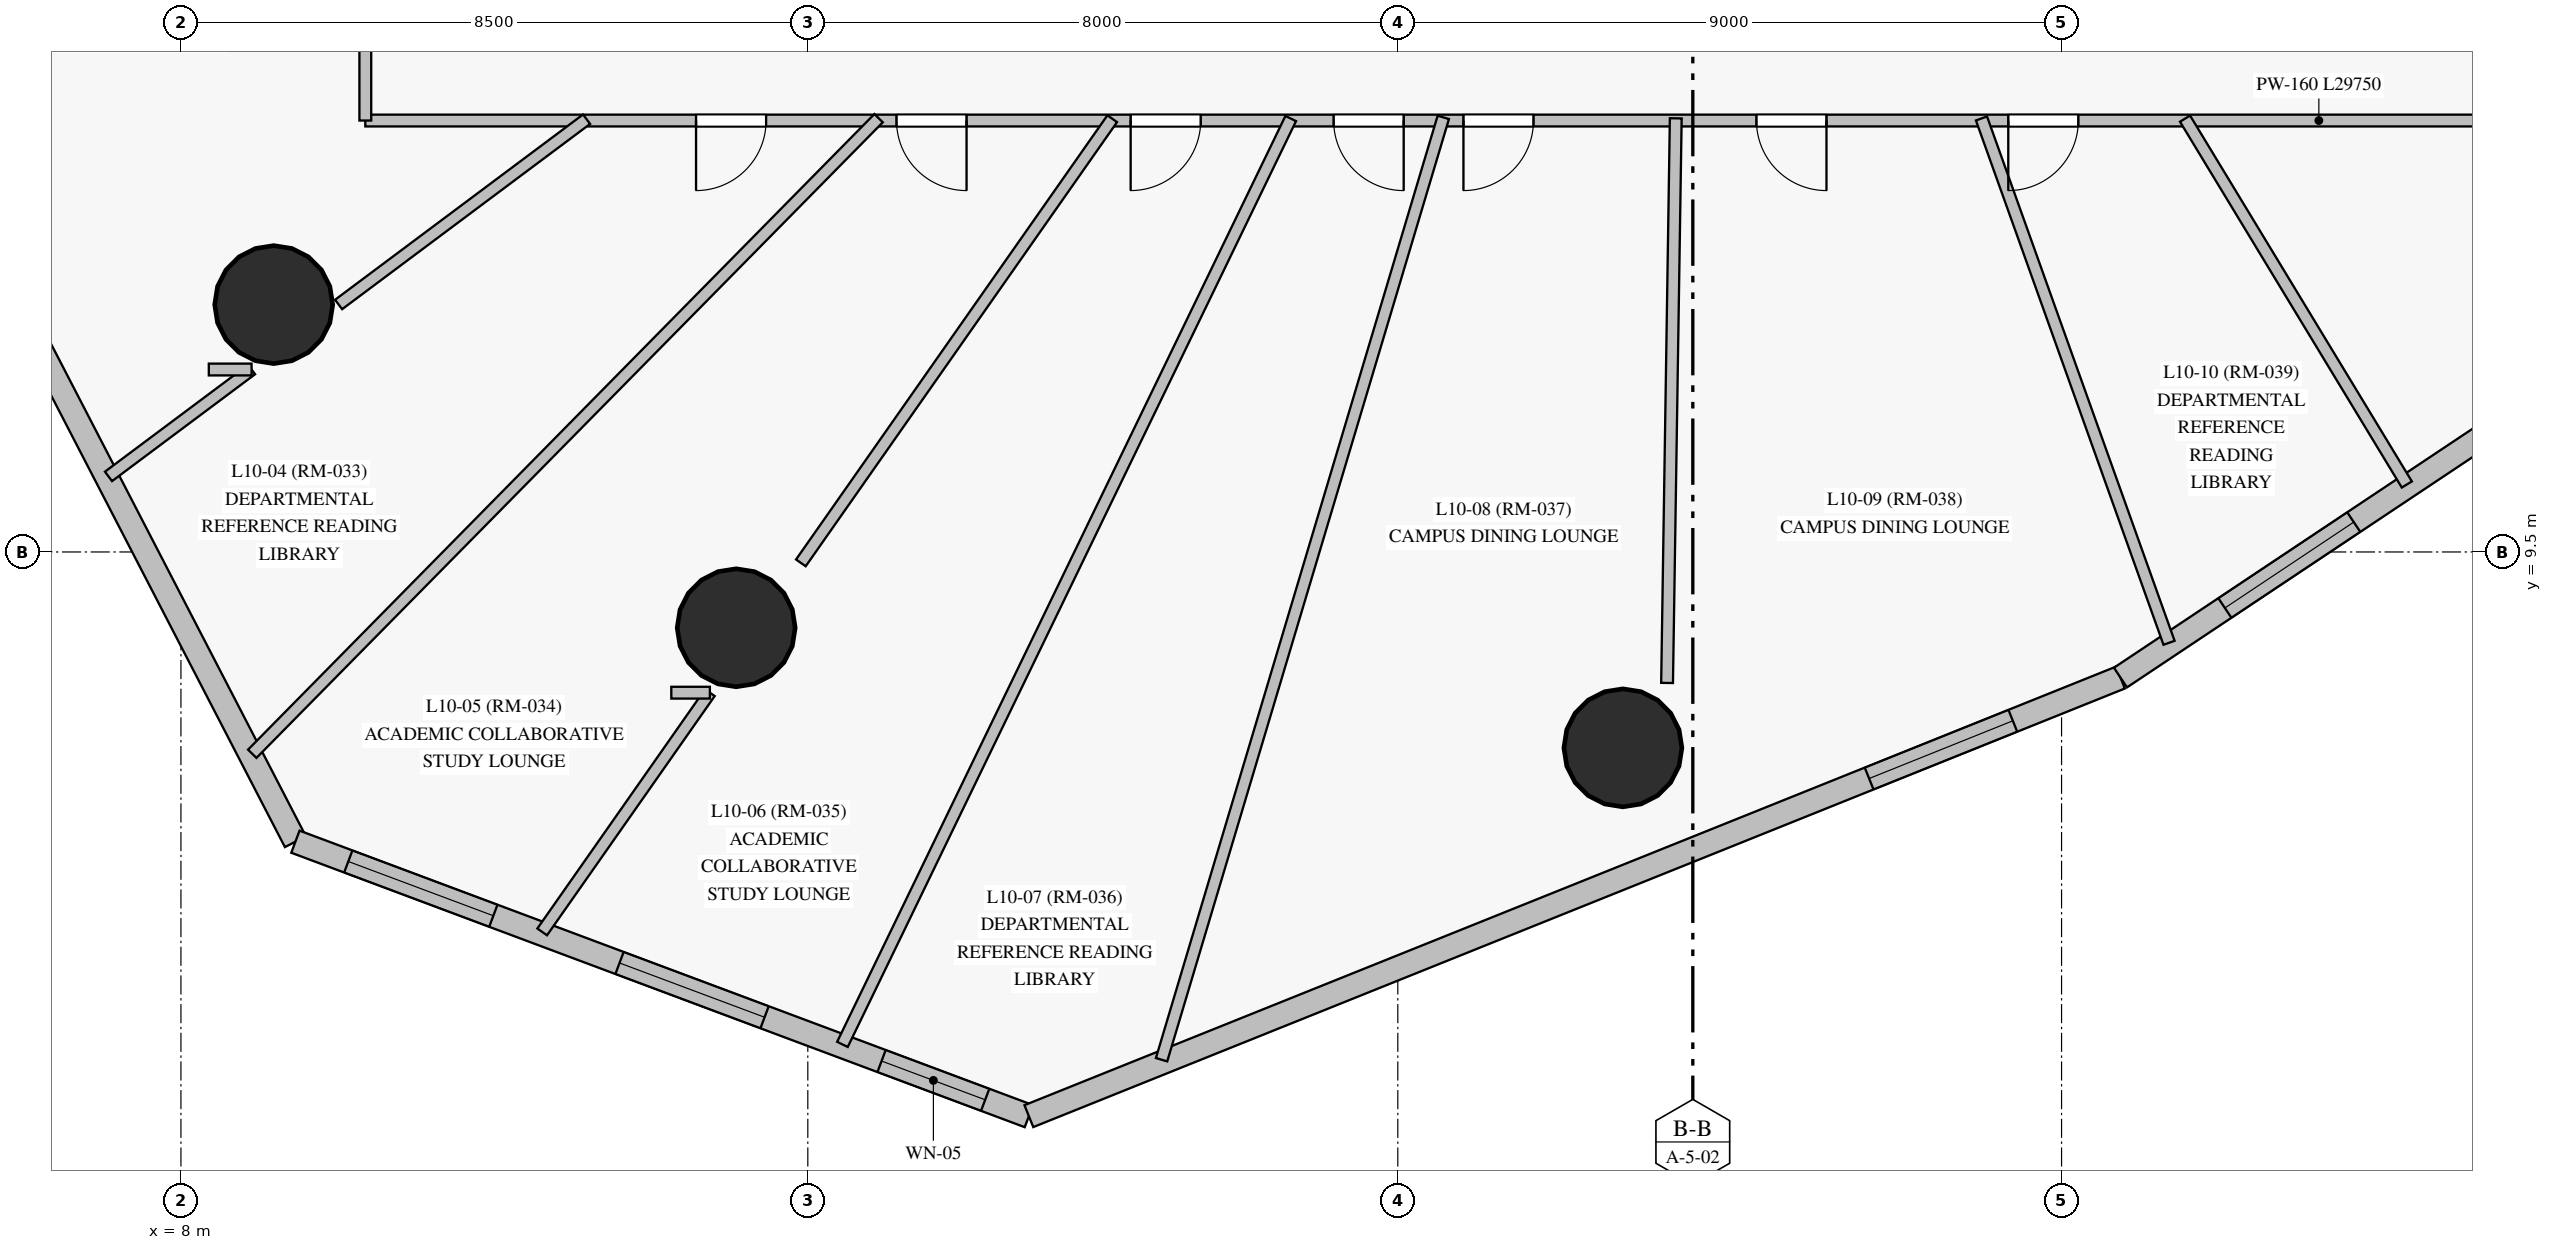
"""IFC4 building model, lengths in metres.
Left out: names, types, materials, properties, quantities, classifications, styles, units other than length and angle.
Written with IfcOpenShell. Run it as: python <this file> out.ifc"""

import sys

from ifc_helpers import new_model, si_unit, direction, frame, frame_2d, origin, origin_with_axes, origin_2d, place, context, subcontext, project, spatial, rectangle, circle, extrude, source, transform, mapped, element, fill, save


model = new_model("IFC4")
c1 = context("Model", 3, precision=1e-05, world=origin(), true_north=direction((0.0, 1.0)))
c2 = subcontext(c1, "Body", "Model", "MODEL_VIEW")
j1 = project(units=[si_unit("LENGTHUNIT", "METRE"), si_unit("PLANEANGLEUNIT", "RADIAN")], contexts=[c1])
p1 = place(None, origin())
s1 = spatial("IfcSite", under=j1, at=p1, CompositionType="ELEMENT")
p2 = place(p1, origin())
s2 = spatial("IfcBuilding", under=s1, at=p2, CompositionType="ELEMENT")
p3 = place(p2, frame((0.0, 0.0, 40.9)))
s3 = spatial("IfcBuildingStorey", under=s2, at=p3, CompositionType="ELEMENT", Elevation=40.9)
m1 = source(origin_with_axes(), c2, "Body", "SweptSolid", [
    extrude(circle(Radius=0.8, at=origin_2d()), origin(), (0.0, 0.0, 1.0), 3.6),
])
for number, where, z_axis, x_axis in (
    (1, (9.258, 12.854, 0.0), (0.0, 0.0, 1.0), (1.0, 0.0, 0.0)),
    (2, (15.529, 8.472, 0.0), (0.0, 0.0, 1.0), (1.0, 0.0, 0.0)),
    (3, (27.552, 6.844, 0.0), (0.0, 0.0, 1.0), (1.0, 0.0, 0.0)),
):
    element("IfcColumn", number, at=place(p3, frame(where, z_axis=z_axis, x_axis=x_axis)), inside=s3, PredefinedType="COLUMN", context=c2, shape_type="MappedRepresentation", body=[
        mapped(m1, transform((0.0, 0.0, 0.0), scale=1.0)),
    ])
p4 = place(p3, frame((3.479, 17.305, 0.0), z_axis=(0.0, 0.0, 1.0), x_axis=(0.459668719491, -0.888090461789, 0.0)))
e4 = element("IfcWall", 4, at=p4, inside=s3, PredefinedType="SOLIDWALL", context=c2, shape_type="SweptSolid", body=[
    extrude(rectangle(XDim=13.212, YDim=0.32, at=frame_2d((6.606, 0.0))), origin(), (0.0, 0.0, 1.0), 3.35),
])
p5 = place(p4, frame((2.236, 0.0, 0.85)))
e5 = element("IfcOpeningElement", 5, at=p5, cuts=e4, PredefinedType="OPENING", context=c2, shape_type="SweptSolid", body=[
    extrude(rectangle(XDim=2.1, YDim=1.95, at=frame_2d((1.05, 0.975))), frame((0.0, 0.17, 0.0), z_axis=(0.0, -1.0, 0.0), x_axis=(1.0, 0.0, 0.0)), (0.0, 0.0, 1.0), 0.34),
])
p6 = place(p3, frame((9.552, 5.572, 0.0), z_axis=(0.0, 0.0, 1.0), x_axis=(0.936575558509, -0.350465723293, 0.0)))
e6 = element("IfcWall", 6, at=p6, inside=s3, PredefinedType="SOLIDWALL", context=c2, shape_type="SweptSolid", body=[
    extrude(rectangle(XDim=10.619, YDim=0.32, at=frame_2d((5.309, 0.0))), origin(), (0.0, 0.0, 1.0), 3.35),
])
p7 = place(p6, frame((0.766, 0.0, 0.85)))
e7 = element("IfcOpeningElement", 7, at=p7, cuts=e6, PredefinedType="OPENING", context=c2, shape_type="SweptSolid", body=[
    extrude(rectangle(XDim=2.1, YDim=1.95, at=frame_2d((1.05, 0.975))), frame((0.0, 0.17, 0.0), z_axis=(0.0, -1.0, 0.0), x_axis=(1.0, 0.0, 0.0)), (0.0, 0.0, 1.0), 0.34),
])
p8 = place(p6, frame((4.692, 0.0, 0.85)))
e8 = element("IfcOpeningElement", 8, at=p8, cuts=e6, PredefinedType="OPENING", context=c2, shape_type="SweptSolid", body=[
    extrude(rectangle(XDim=2.1, YDim=1.95, at=frame_2d((1.05, 0.975))), frame((0.0, 0.17, 0.0), z_axis=(0.0, -1.0, 0.0), x_axis=(1.0, 0.0, 0.0)), (0.0, 0.0, 1.0), 0.34),
])
p9 = place(p6, frame((8.486, 0.0, 0.85)))
e9 = element("IfcOpeningElement", 9, at=p9, cuts=e6, PredefinedType="OPENING", context=c2, shape_type="SweptSolid", body=[
    extrude(rectangle(XDim=1.5, YDim=1.85, at=frame_2d((0.75, 0.925))), frame((0.0, 0.17, 0.0), z_axis=(0.0, -1.0, 0.0), x_axis=(1.0, 0.0, 0.0)), (0.0, 0.0, 1.0), 0.34),
])
p10 = place(p3, frame((19.497, 1.85, 0.0), z_axis=(0.0, 0.0, 1.0), x_axis=(0.927904553419, 0.372817837213, 0.0)))
e10 = element("IfcWall", 10, at=p10, inside=s3, PredefinedType="SOLIDWALL", context=c2, shape_type="SweptSolid", body=[
    extrude(rectangle(XDim=15.952, YDim=0.32, at=frame_2d((7.976, 0.0))), origin(), (0.0, 0.0, 1.0), 3.02),
])
p11 = place(p10, frame((12.279, 0.0, 0.85)))
e11 = element("IfcOpeningElement", 11, at=p11, cuts=e10, PredefinedType="OPENING", context=c2, shape_type="SweptSolid", body=[
    extrude(rectangle(XDim=2.1, YDim=1.95, at=frame_2d((1.05, 0.975))), frame((0.0, 0.17, 0.0), z_axis=(0.0, -1.0, 0.0), x_axis=(1.0, 0.0, 0.0)), (0.0, 0.0, 1.0), 0.34),
])
p12 = place(p3, frame((34.299, 7.797, 0.0), z_axis=(0.0, 0.0, 1.0), x_axis=(0.832151862044, 0.554547814437, 0.0)))
e12 = element("IfcWall", 12, at=p12, inside=s3, PredefinedType="SOLIDWALL", context=c2, shape_type="SweptSolid", body=[
    extrude(rectangle(XDim=11.093, YDim=0.32, at=frame_2d((5.546, 0.0))), origin(), (0.0, 0.0, 1.0), 3.35),
])
p13 = place(p12, frame((1.701, 0.0, 0.85)))
e13 = element("IfcOpeningElement", 13, at=p13, cuts=e12, PredefinedType="OPENING", context=c2, shape_type="SweptSolid", body=[
    extrude(rectangle(XDim=2.1, YDim=1.95, at=frame_2d((1.05, 0.975))), frame((0.0, 0.17, 0.0), z_axis=(0.0, -1.0, 0.0), x_axis=(1.0, 0.0, 0.0)), (0.0, 0.0, 1.0), 0.34),
])
p14 = place(p12, frame((6.809, 0.0, 0.85)))
e14 = element("IfcOpeningElement", 14, at=p14, cuts=e12, PredefinedType="OPENING", context=c2, shape_type="SweptSolid", body=[
    extrude(rectangle(XDim=2.1, YDim=1.95, at=frame_2d((1.05, 0.975))), frame((0.0, 0.17, 0.0), z_axis=(0.0, -1.0, 0.0), x_axis=(1.0, 0.0, 0.0)), (0.0, 0.0, 1.0), 0.34),
])
p15 = place(p3, frame((40.25, 15.35, 0.0), z_axis=(0.0, 0.0, 1.0), x_axis=(-1.0, 0.0, 0.0)))
e15 = element("IfcWall", 15, at=p15, inside=s3, PredefinedType="PARTITIONING", context=c2, shape_type="SweptSolid", body=[
    extrude(rectangle(XDim=29.75, YDim=0.16, at=frame_2d((14.875, 0.0))), origin(), (0.0, 0.0, 1.0), 2.7),
])
p16 = place(p15, frame((24.315, 0.0, 0.0)))
e16 = element("IfcOpeningElement", 16, at=p16, cuts=e15, PredefinedType="OPENING", context=c2, shape_type="SweptSolid", body=[
    extrude(rectangle(XDim=0.95, YDim=2.15, at=frame_2d((0.475, 1.075))), frame((0.0, 0.09, 0.0), z_axis=(0.0, -1.0, 0.0), x_axis=(1.0, 0.0, 0.0)), (0.0, 0.0, 1.0), 0.18),
])
p17 = place(p15, frame((21.597, 0.0, 0.0)))
e17 = element("IfcOpeningElement", 17, at=p17, cuts=e15, PredefinedType="OPENING", context=c2, shape_type="SweptSolid", body=[
    extrude(rectangle(XDim=0.95, YDim=2.15, at=frame_2d((0.475, 1.075))), frame((0.0, 0.09, 0.0), z_axis=(0.0, -1.0, 0.0), x_axis=(1.0, 0.0, 0.0)), (0.0, 0.0, 1.0), 0.18),
])
p18 = place(p15, frame((18.423, 0.0, 0.0)))
e18 = element("IfcOpeningElement", 18, at=p18, cuts=e15, PredefinedType="OPENING", context=c2, shape_type="SweptSolid", body=[
    extrude(rectangle(XDim=0.95, YDim=2.15, at=frame_2d((0.475, 1.075))), frame((0.0, 0.09, 0.0), z_axis=(0.0, -1.0, 0.0), x_axis=(1.0, 0.0, 0.0)), (0.0, 0.0, 1.0), 0.18),
])
p19 = place(p15, frame((15.67, 0.0, 0.0)))
e19 = element("IfcOpeningElement", 19, at=p19, cuts=e15, PredefinedType="OPENING", context=c2, shape_type="SweptSolid", body=[
    extrude(rectangle(XDim=0.95, YDim=2.15, at=frame_2d((0.475, 1.075))), frame((0.0, 0.09, 0.0), z_axis=(0.0, -1.0, 0.0), x_axis=(1.0, 0.0, 0.0)), (0.0, 0.0, 1.0), 0.18),
])
p20 = place(p15, frame((13.91, 0.0, 0.0)))
e20 = element("IfcOpeningElement", 20, at=p20, cuts=e15, PredefinedType="OPENING", context=c2, shape_type="SweptSolid", body=[
    extrude(rectangle(XDim=0.95, YDim=2.15, at=frame_2d((0.475, 1.075))), frame((0.0, 0.09, 0.0), z_axis=(0.0, -1.0, 0.0), x_axis=(1.0, 0.0, 0.0)), (0.0, 0.0, 1.0), 0.18),
])
p21 = place(p15, frame((9.938, 0.0, 0.0)))
e21 = element("IfcOpeningElement", 21, at=p21, cuts=e15, PredefinedType="OPENING", context=c2, shape_type="SweptSolid", body=[
    extrude(rectangle(XDim=0.95, YDim=2.15, at=frame_2d((0.475, 1.075))), frame((0.0, 0.09, 0.0), z_axis=(0.0, -1.0, 0.0), x_axis=(1.0, 0.0, 0.0)), (0.0, 0.0, 1.0), 0.18),
])
p22 = place(p15, frame((6.522, 0.0, 0.0)))
e22 = element("IfcOpeningElement", 22, at=p22, cuts=e15, PredefinedType="OPENING", context=c2, shape_type="SweptSolid", body=[
    extrude(rectangle(XDim=0.95, YDim=2.15, at=frame_2d((0.475, 1.075))), frame((0.0, 0.09, 0.0), z_axis=(0.0, -1.0, 0.0), x_axis=(1.0, 0.0, 0.0)), (0.0, 0.0, 1.0), 0.18),
])
p23 = place(p3, frame((10.5, 15.35, 0.0), z_axis=(0.0, 0.0, 1.0), x_axis=(0.0, 1.0, 0.0)))
e23 = element("IfcWall", 23, at=p23, inside=s3, PredefinedType="PARTITIONING", context=c2, shape_type="SweptSolid", body=[
    extrude(rectangle(XDim=22.3, YDim=0.16, at=frame_2d((11.15, 0.0))), origin(), (0.0, 0.0, 1.0), 2.75),
])
p24 = place(p23, frame((10.675, 0.0, 0.0)))
e24 = element("IfcOpeningElement", 24, at=p24, cuts=e23, PredefinedType="OPENING", context=c2, shape_type="SweptSolid", body=[
    extrude(rectangle(XDim=0.95, YDim=2.15, at=frame_2d((0.475, 1.075))), frame((0.0, 0.09, 0.0), z_axis=(0.0, -1.0, 0.0), x_axis=(1.0, 0.0, 0.0)), (0.0, 0.0, 1.0), 0.18),
])
p25 = place(p23, frame((5.54, 0.0, 0.0)))
e25 = element("IfcOpeningElement", 25, at=p25, cuts=e23, PredefinedType="OPENING", context=c2, shape_type="SweptSolid", body=[
    extrude(rectangle(XDim=0.96, YDim=2.15, at=frame_2d((0.48, 1.075))), frame((0.0, 0.09, 0.0), z_axis=(0.0, -1.0, 0.0), x_axis=(1.0, 0.0, 0.0)), (0.0, 0.0, 1.0), 0.18),
])
p26 = place(p23, frame((2.055, 0.0, 0.0)))
e26 = element("IfcOpeningElement", 26, at=p26, cuts=e23, PredefinedType="OPENING", context=c2, shape_type="SweptSolid", body=[
    extrude(rectangle(XDim=0.95, YDim=2.15, at=frame_2d((0.475, 1.075))), frame((0.0, 0.09, 0.0), z_axis=(0.0, -1.0, 0.0), x_axis=(1.0, 0.0, 0.0)), (0.0, 0.0, 1.0), 0.18),
])
p27 = place(p23, frame((14.02, 0.0, 0.0)))
e27 = element("IfcOpeningElement", 27, at=p27, cuts=e23, PredefinedType="OPENING", context=c2, shape_type="SweptSolid", body=[
    extrude(rectangle(XDim=0.95, YDim=2.15, at=frame_2d((0.475, 1.075))), frame((0.0, 0.09, 0.0), z_axis=(0.0, -1.0, 0.0), x_axis=(1.0, 0.0, 0.0)), (0.0, 0.0, 1.0), 0.18),
])
p28 = place(p3, frame((23.048, 15.377, 0.0), z_axis=(0.0, 0.0, 1.0), x_axis=(-0.435779145483, -0.900053629715, 0.0)))
e28 = element("IfcWall", 28, at=p28, inside=s3, PredefinedType="PARTITIONING", context=c2, shape_type="SweptSolid", body=[
    extrude(rectangle(XDim=13.948, YDim=0.16, at=frame_2d((6.974, 0.0))), origin(), (0.0, 0.0, 1.0), 3.35),
])
p29 = place(p3, frame((25.117, 15.393, 0.0), z_axis=(0.0, 0.0, 1.0), x_axis=(-0.286429110133, -0.958101437672, 0.0)))
e29 = element("IfcWall", 29, at=p29, inside=s3, PredefinedType="PARTITIONING", context=c2, shape_type="SweptSolid", body=[
    extrude(rectangle(XDim=13.337, YDim=0.16, at=frame_2d((6.668, 0.0))), origin(), (0.0, 0.0, 1.0), 3.35),
])
p30 = place(p3, frame((17.46, 15.382, 0.0), z_axis=(0.0, 0.0, 1.0), x_axis=(-0.701892154134, -0.712283232967, 0.0)))
e30 = element("IfcWall", 30, at=p30, inside=s3, PredefinedType="PARTITIONING", context=c2, shape_type="SweptSolid", body=[
    extrude(rectangle(XDim=12.1, YDim=0.16, at=frame_2d((6.05, 0.0))), origin(), (0.0, 0.0, 1.0), 3.35),
])
p31 = place(p3, frame((28.269, 15.38, 0.0), z_axis=(0.0, 0.0, 1.0), x_axis=(-0.015400941242, -0.999881398471, 0.0)))
e31 = element("IfcWall", 31, at=p31, inside=s3, PredefinedType="PARTITIONING", context=c2, shape_type="SweptSolid", body=[
    extrude(rectangle(XDim=7.657, YDim=0.16, at=frame_2d((3.828, 0.0))), origin(), (0.0, 0.0, 1.0), 3.35),
])
p32 = place(p3, frame((32.414, 15.378, 0.0), z_axis=(0.0, 0.0, 1.0), x_axis=(0.336803342159, -0.941575014914, 0.0)))
e32 = element("IfcWall", 32, at=p32, inside=s3, PredefinedType="PARTITIONING", context=c2, shape_type="SweptSolid", body=[
    extrude(rectangle(XDim=7.551, YDim=0.16, at=frame_2d((3.775, 0.0))), origin(), (0.0, 0.0, 1.0), 3.35),
])
p33 = place(p3, frame((20.628, 15.375, 0.0), z_axis=(0.0, 0.0, 1.0), x_axis=(-0.574028069181, -0.818835621961, 0.0)))
e33 = element("IfcWall", 33, at=p33, inside=s3, PredefinedType="PARTITIONING", context=c2, shape_type="SweptSolid", body=[
    extrude(rectangle(XDim=7.355, YDim=0.16, at=frame_2d((3.677, 0.0))), origin(), (0.0, 0.0, 1.0), 2.7),
])
p34 = place(p3, frame((35.174, 15.376, 0.0), z_axis=(0.0, 0.0, 1.0), x_axis=(0.518438816118, -0.855114725603, 0.0)))
e34 = element("IfcWall", 34, at=p34, inside=s3, PredefinedType="PARTITIONING", context=c2, shape_type="SweptSolid", body=[
    extrude(rectangle(XDim=5.801, YDim=0.16, at=frame_2d((2.901, 0.0))), origin(), (0.0, 0.0, 1.0), 3.35),
])
p35 = place(p3, frame((13.5, 15.368, 0.0), z_axis=(0.0, 0.0, 1.0), x_axis=(-0.801087584636, -0.598547142456, 0.0)))
e35 = element("IfcWall", 35, at=p35, inside=s3, PredefinedType="PARTITIONING", context=c2, shape_type="SweptSolid", body=[
    extrude(rectangle(XDim=4.197, YDim=0.16, at=frame_2d((2.099, 0.0))), origin(), (0.0, 0.0, 1.0), 2.7),
])
p36 = place(p3, frame((15.172, 7.592, 0.0), z_axis=(0.0, 0.0, 1.0), x_axis=(-0.574033017638, -0.818832152924, 0.0)))
e36 = element("IfcWall", 36, at=p36, inside=s3, PredefinedType="PARTITIONING", context=c2, shape_type="SweptSolid", body=[
    extrude(rectangle(XDim=3.961, YDim=0.16, at=frame_2d((1.981, 0.0))), origin(), (0.0, 0.0, 1.0), 3.35),
])
p37 = place(p3, frame((8.958, 11.974, 0.0), z_axis=(0.0, 0.0, 1.0), x_axis=(-0.801075279983, -0.598563610487, 0.0)))
e37 = element("IfcWall", 37, at=p37, inside=s3, PredefinedType="PARTITIONING", context=c2, shape_type="SweptSolid", body=[
    extrude(rectangle(XDim=2.422, YDim=0.16, at=frame_2d((1.211, 0.0))), origin(), (0.0, 0.0, 1.0), 3.02),
])
p38 = place(p3, frame((8.378, 11.974, 0.0), z_axis=(0.0, 0.0, 1.0), x_axis=(1.0, 0.0, 0.0)))
e38 = element("IfcWall", 38, at=p38, inside=s3, PredefinedType="PARTITIONING", context=c2, shape_type="SweptSolid", body=[
    extrude(rectangle(XDim=0.58, YDim=0.16, at=frame_2d((0.29, 0.0))), origin(), (0.0, 0.0, 1.0), 3.35),
])
p39 = place(p3, frame((14.649, 7.592, 0.0), z_axis=(0.0, 0.0, 1.0), x_axis=(1.0, 0.0, 0.0)))
e39 = element("IfcWall", 39, at=p39, inside=s3, PredefinedType="PARTITIONING", context=c2, shape_type="SweptSolid", body=[
    extrude(rectangle(XDim=0.523, YDim=0.16, at=frame_2d((0.262, 0.0))), origin(), (0.0, 0.0, 1.0), 3.02),
])
m2 = source(origin_with_axes(), c2, "Body", "SweptSolid", [
    extrude(rectangle(XDim=2.1, YDim=1.95, at=frame_2d((1.05, 0.975))), frame((0.0, 0.03, 0.0), z_axis=(0.0, -1.0, 0.0), x_axis=(1.0, 0.0, 0.0)), (0.0, 0.0, 1.0), 0.06),
])
p40 = place(p7, origin())
e40 = element("IfcWindow", 40, at=p40, inside=s3, PartitioningType="SINGLE_PANEL", PredefinedType="WINDOW", context=c2, shape_type="MappedRepresentation", body=[
    mapped(m2, transform((0.0, 0.0, 0.0), scale=1.0)),
])
fill(e7, e40)
p41 = place(p8, origin())
e41 = element("IfcWindow", 41, at=p41, inside=s3, PartitioningType="SINGLE_PANEL", PredefinedType="WINDOW", context=c2, shape_type="MappedRepresentation", body=[
    mapped(m2, transform((0.0, 0.0, 0.0), scale=1.0)),
])
fill(e8, e41)
m3 = source(origin_with_axes(), c2, "Body", "SweptSolid", [
    extrude(rectangle(XDim=1.5, YDim=1.85, at=frame_2d((0.75, 0.925))), frame((0.0, 0.03, 0.0), z_axis=(0.0, -1.0, 0.0), x_axis=(1.0, 0.0, 0.0)), (0.0, 0.0, 1.0), 0.06),
])
p42 = place(p9, origin())
e42 = element("IfcWindow", 42, at=p42, inside=s3, PartitioningType="SINGLE_PANEL", PredefinedType="WINDOW", context=c2, shape_type="MappedRepresentation", body=[
    mapped(m3, transform((0.0, 0.0, 0.0), scale=1.0)),
])
fill(e9, e42)
p43 = place(p11, origin())
e43 = element("IfcWindow", 43, at=p43, inside=s3, PartitioningType="SINGLE_PANEL", PredefinedType="WINDOW", context=c2, shape_type="MappedRepresentation", body=[
    mapped(m2, transform((0.0, 0.0, 0.0), scale=1.0)),
])
fill(e11, e43)
p44 = place(p13, origin())
e44 = element("IfcWindow", 44, at=p44, inside=s3, PartitioningType="SINGLE_PANEL", PredefinedType="WINDOW", context=c2, shape_type="MappedRepresentation", body=[
    mapped(m2, transform((0.0, 0.0, 0.0), scale=1.0)),
])
fill(e13, e44)
m4 = source(origin_with_axes(), c2, "Body", "SweptSolid", [
    extrude(rectangle(XDim=0.95, YDim=2.15, at=frame_2d((0.475, 1.075))), frame((0.0, 0.025, 0.0), z_axis=(0.0, -1.0, 0.0), x_axis=(1.0, 0.0, 0.0)), (0.0, 0.0, 1.0), 0.05),
])
p45 = place(p16, origin())
e45 = element("IfcDoor", 45, at=p45, inside=s3, OperationType="SINGLE_SWING_RIGHT", PredefinedType="DOOR", context=c2, shape_type="MappedRepresentation", body=[
    mapped(m4, transform((0.0, 0.0, 0.0), scale=1.0)),
])
fill(e16, e45)
p46 = place(p17, origin())
e46 = element("IfcDoor", 46, at=p46, inside=s3, OperationType="SINGLE_SWING_LEFT", PredefinedType="DOOR", context=c2, shape_type="MappedRepresentation", body=[
    mapped(m4, transform((0.0, 0.0, 0.0), scale=1.0)),
])
fill(e17, e46)
p47 = place(p18, origin())
e47 = element("IfcDoor", 47, at=p47, inside=s3, OperationType="SINGLE_SWING_RIGHT", PredefinedType="DOOR", context=c2, shape_type="MappedRepresentation", body=[
    mapped(m4, transform((0.0, 0.0, 0.0), scale=1.0)),
])
fill(e18, e47)
p48 = place(p19, origin())
e48 = element("IfcDoor", 48, at=p48, inside=s3, OperationType="SINGLE_SWING_LEFT", PredefinedType="DOOR", context=c2, shape_type="MappedRepresentation", body=[
    mapped(m4, transform((0.0, 0.0, 0.0), scale=1.0)),
])
fill(e19, e48)
p49 = place(p20, origin())
e49 = element("IfcDoor", 49, at=p49, inside=s3, OperationType="SINGLE_SWING_RIGHT", PredefinedType="DOOR", context=c2, shape_type="MappedRepresentation", body=[
    mapped(m4, transform((0.0, 0.0, 0.0), scale=1.0)),
])
fill(e20, e49)
p50 = place(p21, origin())
e50 = element("IfcDoor", 50, at=p50, inside=s3, OperationType="SINGLE_SWING_LEFT", PredefinedType="DOOR", context=c2, shape_type="MappedRepresentation", body=[
    mapped(m4, transform((0.0, 0.0, 0.0), scale=1.0)),
])
fill(e21, e50)
p51 = place(p22, origin())
e51 = element("IfcDoor", 51, at=p51, inside=s3, OperationType="SINGLE_SWING_RIGHT", PredefinedType="DOOR", context=c2, shape_type="MappedRepresentation", body=[
    mapped(m4, transform((0.0, 0.0, 0.0), scale=1.0)),
])
fill(e22, e51)
save(model, sys.argv[1])
